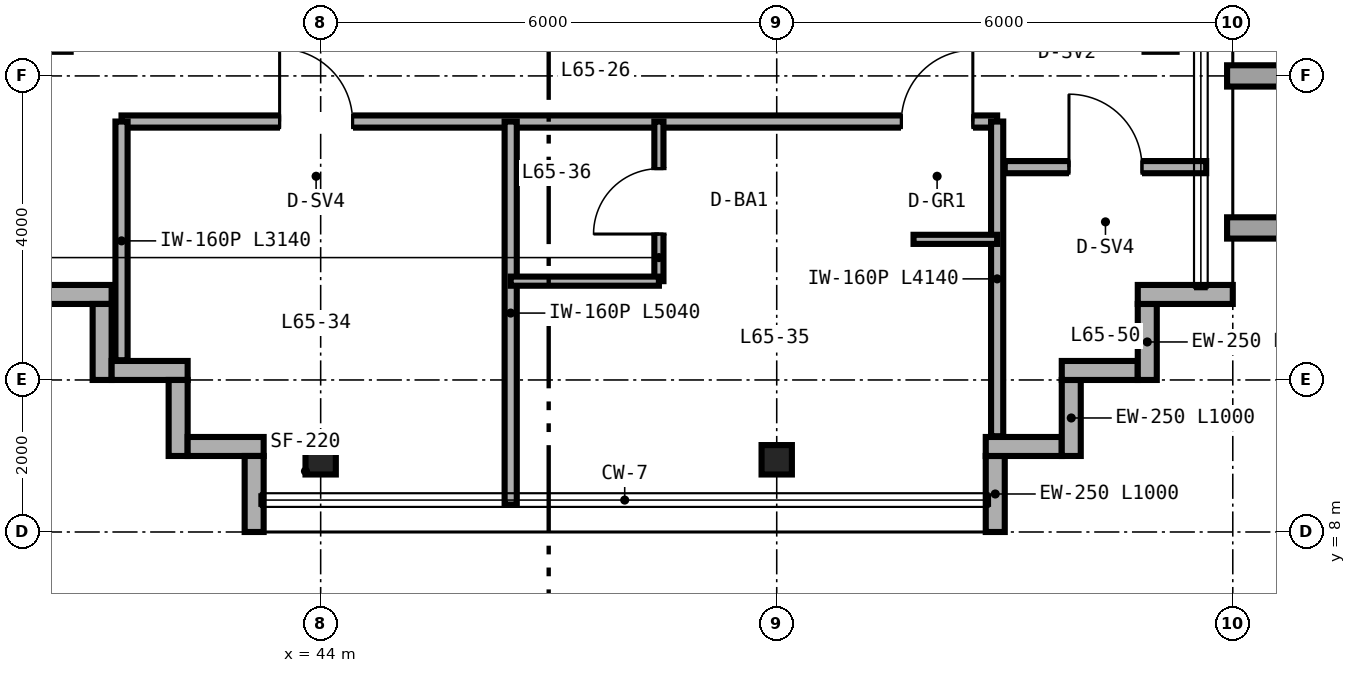
"""IFC4 building model, lengths in metres.
Left out: names, types, materials, properties, quantities, classifications, styles, units other than length and angle.
Written with IfcOpenShell. Run it as: python <this file> out.ifc"""

import sys

from ifc_helpers import new_model, si_unit, direction, frame, frame_2d, origin, origin_2d, place, context, subcontext, project, spatial, rectangle, i_section, extrude, source, transform, mapped, element, fill, save


model = new_model("IFC4")
c1 = context("Model", 3, precision=1e-05, world=origin(), true_north=direction((0.0, 1.0)))
c2 = subcontext(c1, "Body", "Model", "MODEL_VIEW")
j1 = project(units=[si_unit("LENGTHUNIT", "METRE"), si_unit("PLANEANGLEUNIT", "RADIAN")], contexts=[c1])
p1 = place(None, origin())
s1 = spatial("IfcSite", under=j1, at=p1, CompositionType="ELEMENT")
p2 = place(p1, origin())
s2 = spatial("IfcBuilding", under=s1, at=p2, CompositionType="ELEMENT")
p3 = place(p2, frame((0.0, 0.0, 258.0)))
s3 = spatial("IfcBuildingStorey", under=s2, at=p3, CompositionType="ELEMENT", Elevation=258.0)
m1 = source(origin(), c2, "Body", "SweptSolid", [
    extrude(i_section(OverallWidth=0.399, OverallDepth=0.387, WebThickness=0.021, FlangeThickness=0.033, FilletRadius=0.025, at=origin_2d()), origin(), (0.0, 0.0, 1.0), 3.38),
])
for number, where, z_axis, x_axis in (
    (1, (44.0, 8.95, 0.0), (0.0, 0.0, 1.0), (1.0, 0.0, 0.0)),
    (2, (50.0, 8.95, 0.0), (0.0, 0.0, 1.0), (1.0, 0.0, 0.0)),
):
    element("IfcColumn", number, at=place(p3, frame(where, z_axis=z_axis, x_axis=x_axis)), inside=s3, PredefinedType="COLUMN", context=c2, shape_type="MappedRepresentation", body=[
        mapped(m1, transform((0.0, 0.0, 0.0), scale=1.0)),
    ])
for number, where, z_axis, x_axis in (
    (3, (52.875, 8.0, 0.0), (0.0, 0.0, 1.0), (0.0, 1.0, 0.0)),
    (4, (52.75, 9.125, 0.0), (0.0, 0.0, 1.0), (1.0, 0.0, 0.0)),
    (5, (53.875, 9.0, 0.0), (0.0, 0.0, 1.0), (0.0, 1.0, 0.0)),
    (6, (53.75, 10.125, 0.0), (0.0, 0.0, 1.0), (1.0, 0.0, 0.0)),
    (7, (54.875, 10.0, 0.0), (0.0, 0.0, 1.0), (0.0, 1.0, 0.0)),
):
    element("IfcWall", number, at=place(p3, frame(where, z_axis=z_axis, x_axis=x_axis)), inside=s3, PredefinedType="SOLIDWALL", context=c2, shape_type="SweptSolid", body=[
        extrude(rectangle(XDim=1.0, YDim=0.25, at=frame_2d((0.5, 0.0))), origin(), (0.0, 0.0, 1.0), 3.38),
    ])
for number, where, z_axis, x_axis in (
    (8, (54.75, 11.125, 0.0), (0.0, 0.0, 1.0), (1.0, 0.0, 0.0)),
    (9, (40.0, 11.125, 0.0), (0.0, 0.0, 1.0), (1.0, 0.0, 0.0)),
):
    element("IfcWall", number, at=place(p3, frame(where, z_axis=z_axis, x_axis=x_axis)), inside=s3, PredefinedType="SOLIDWALL", context=c2, shape_type="SweptSolid", body=[
        extrude(rectangle(XDim=1.25, YDim=0.25, at=frame_2d((0.625, 0.0))), origin(), (0.0, 0.0, 1.0), 3.38),
    ])
for number, where, z_axis, x_axis in (
    (10, (41.125, 11.0, 0.0), (0.0, 0.0, 1.0), (0.0, -1.0, 0.0)),
    (11, (41.25, 10.125, 0.0), (0.0, 0.0, 1.0), (1.0, 0.0, 0.0)),
    (12, (42.125, 10.0, 0.0), (0.0, 0.0, 1.0), (0.0, -1.0, 0.0)),
    (13, (42.25, 9.125, 0.0), (0.0, 0.0, 1.0), (1.0, 0.0, 0.0)),
    (14, (43.125, 9.0, 0.0), (0.0, 0.0, 1.0), (0.0, -1.0, 0.0)),
):
    element("IfcWall", number, at=place(p3, frame(where, z_axis=z_axis, x_axis=x_axis)), inside=s3, PredefinedType="SOLIDWALL", context=c2, shape_type="SweptSolid", body=[
        extrude(rectangle(XDim=1.0, YDim=0.25, at=frame_2d((0.5, 0.0))), origin(), (0.0, 0.0, 1.0), 3.38),
    ])
p4 = place(p3, frame((41.38, 13.4, 0.0), z_axis=(0.0, 0.0, 1.0), x_axis=(1.0, 0.0, 0.0)))
e15 = element("IfcWall", 15, at=p4, inside=s3, PredefinedType="PARTITIONING", context=c2, shape_type="SweptSolid", body=[
    extrude(rectangle(XDim=11.52, YDim=0.16, at=frame_2d((5.76, 0.0))), origin(), (0.0, 0.0, 1.0), 3.38),
])
p5 = place(p4, frame((2.08, 0.0, 0.0)))
e16 = element("IfcOpeningElement", 16, at=p5, cuts=e15, PredefinedType="OPENING", context=c2, shape_type="SweptSolid", body=[
    extrude(rectangle(XDim=0.96, YDim=2.15, at=frame_2d((0.48, 1.075))), frame((0.0, 0.09, 0.0), z_axis=(0.0, -1.0, 0.0), x_axis=(1.0, 0.0, 0.0)), (0.0, 0.0, 1.0), 0.18),
])
p6 = place(p4, frame((10.26, 0.0, 0.0)))
e17 = element("IfcOpeningElement", 17, at=p6, cuts=e15, PredefinedType="OPENING", context=c2, shape_type="SweptSolid", body=[
    extrude(rectangle(XDim=0.94, YDim=2.15, at=frame_2d((0.47, 1.075))), frame((0.0, 0.09, 0.0), z_axis=(0.0, -1.0, 0.0), x_axis=(1.0, 0.0, 0.0)), (0.0, 0.0, 1.0), 0.18),
])
p7 = place(p3, frame((41.38, 10.26, 0.0), z_axis=(0.0, 0.0, 1.0), x_axis=(0.0, 1.0, 0.0)))
e18 = element("IfcWall", 18, at=p7, inside=s3, PredefinedType="PARTITIONING", context=c2, shape_type="SweptSolid", body=[
    extrude(rectangle(XDim=3.14, YDim=0.16, at=frame_2d((1.57, 0.0))), origin(), (0.0, 0.0, 1.0), 3.38),
])
p8 = place(p3, frame((52.9, 9.26, 0.0), z_axis=(0.0, 0.0, 1.0), x_axis=(0.0, 1.0, 0.0)))
e19 = element("IfcWall", 19, at=p8, inside=s3, PredefinedType="PARTITIONING", context=c2, shape_type="SweptSolid", body=[
    extrude(rectangle(XDim=4.14, YDim=0.16, at=frame_2d((2.07, 0.0))), origin(), (0.0, 0.0, 1.0), 3.38),
])
p9 = place(p3, frame((46.5, 8.36, 0.0), z_axis=(0.0, 0.0, 1.0), x_axis=(0.0, 1.0, 0.0)))
e20 = element("IfcWall", 20, at=p9, inside=s3, PredefinedType="PARTITIONING", context=c2, shape_type="SweptSolid", body=[
    extrude(rectangle(XDim=5.04, YDim=0.16, at=frame_2d((2.52, 0.0))), origin(), (0.0, 0.0, 1.0), 2.687),
])
p10 = place(p3, frame((48.45, 11.3, 0.0), z_axis=(0.0, 0.0, 1.0), x_axis=(0.0, 1.0, 0.0)))
e21 = element("IfcWall", 21, at=p10, inside=s3, PredefinedType="PARTITIONING", context=c2, shape_type="SweptSolid", body=[
    extrude(rectangle(XDim=2.1, YDim=0.12, at=frame_2d((1.05, 0.0))), origin(), (0.0, 0.0, 1.0), 3.38),
])
p11 = place(p10, frame((0.62, 0.0, 0.0)))
e22 = element("IfcOpeningElement", 22, at=p11, cuts=e21, PredefinedType="OPENING", context=c2, shape_type="SweptSolid", body=[
    extrude(rectangle(XDim=0.86, YDim=2.1, at=frame_2d((0.43, 1.05))), frame((0.0, 0.07, 0.0), z_axis=(0.0, -1.0, 0.0), x_axis=(1.0, 0.0, 0.0)), (0.0, 0.0, 1.0), 0.14),
])
p12 = place(p3, frame((46.5, 11.3, 0.0), z_axis=(0.0, 0.0, 1.0), x_axis=(1.0, 0.0, 0.0)))
e23 = element("IfcWall", 23, at=p12, inside=s3, PredefinedType="PARTITIONING", context=c2, shape_type="SweptSolid", body=[
    extrude(rectangle(XDim=1.95, YDim=0.12, at=frame_2d((0.975, 0.0))), origin(), (0.0, 0.0, 1.0), 3.38),
])
p13 = place(p3, frame((51.8, 11.85, 0.0), z_axis=(0.0, 0.0, 1.0), x_axis=(1.0, 0.0, 0.0)))
e24 = element("IfcWall", 24, at=p13, inside=s3, PredefinedType="PARTITIONING", context=c2, shape_type="SweptSolid", body=[
    extrude(rectangle(XDim=1.1, YDim=0.12, at=frame_2d((0.55, 0.0))), origin(), (0.0, 0.0, 1.0), 3.38),
])
p14 = place(p3, frame((53.0, 12.8, 0.0), z_axis=(0.0, 0.0, 1.0), x_axis=(1.0, 0.0, 0.0)))
e25 = element("IfcWall", 25, at=p14, inside=s3, PredefinedType="PARTITIONING", context=c2, shape_type="SweptSolid", body=[
    extrude(rectangle(XDim=2.65, YDim=0.16, at=frame_2d((1.325, 0.0))), origin(), (0.0, 0.0, 1.0), 3.38),
])
p15 = place(p14, frame((0.845, 0.0, 0.0)))
e26 = element("IfcOpeningElement", 26, at=p15, cuts=e25, PredefinedType="OPENING", context=c2, shape_type="SweptSolid", body=[
    extrude(rectangle(XDim=0.96, YDim=2.15, at=frame_2d((0.48, 1.075))), frame((0.0, 0.09, 0.0), z_axis=(0.0, -1.0, 0.0), x_axis=(1.0, 0.0, 0.0)), (0.0, 0.0, 1.0), 0.18),
])
m2 = source(origin(), c2, "Body", "SweptSolid", [
    extrude(rectangle(XDim=0.86, YDim=2.1, at=frame_2d((0.43, 1.05))), frame((0.0, 0.025, 0.0), z_axis=(0.0, -1.0, 0.0), x_axis=(1.0, 0.0, 0.0)), (0.0, 0.0, 1.0), 0.05),
])
p16 = place(p11, origin())
e27 = element("IfcDoor", 27, at=p16, inside=s3, OperationType="SINGLE_SWING_LEFT", PredefinedType="DOOR", context=c2, shape_type="MappedRepresentation", body=[
    mapped(m2, transform((0.0, 0.0, 0.0), scale=1.0)),
])
fill(e22, e27)
m3 = source(origin(), c2, "Body", "SweptSolid", [
    extrude(rectangle(XDim=0.96, YDim=2.15, at=frame_2d((0.48, 1.075))), frame((0.0, 0.025, 0.0), z_axis=(0.0, -1.0, 0.0), x_axis=(1.0, 0.0, 0.0)), (0.0, 0.0, 1.0), 0.05),
])
p17 = place(p5, origin())
e28 = element("IfcDoor", 28, at=p17, inside=s3, OperationType="SINGLE_SWING_LEFT", PredefinedType="DOOR", context=c2, shape_type="MappedRepresentation", body=[
    mapped(m3, transform((0.0, 0.0, 0.0), scale=1.0)),
])
fill(e16, e28)
m4 = source(origin(), c2, "Body", "SweptSolid", [
    extrude(rectangle(XDim=0.94, YDim=2.15, at=frame_2d((0.47, 1.075))), frame((0.0, 0.025, 0.0), z_axis=(0.0, -1.0, 0.0), x_axis=(1.0, 0.0, 0.0)), (0.0, 0.0, 1.0), 0.05),
])
p18 = place(p6, origin())
e29 = element("IfcDoor", 29, at=p18, inside=s3, OperationType="SINGLE_SWING_RIGHT", PredefinedType="DOOR", context=c2, shape_type="MappedRepresentation", body=[
    mapped(m4, transform((0.0, 0.0, 0.0), scale=1.0)),
])
fill(e17, e29)
p19 = place(p15, origin())
e30 = element("IfcDoor", 30, at=p19, inside=s3, OperationType="SINGLE_SWING_LEFT", PredefinedType="DOOR", context=c2, shape_type="MappedRepresentation", body=[
    mapped(m3, transform((0.0, 0.0, 0.0), scale=1.0)),
])
fill(e26, e30)
save(model, sys.argv[1])
